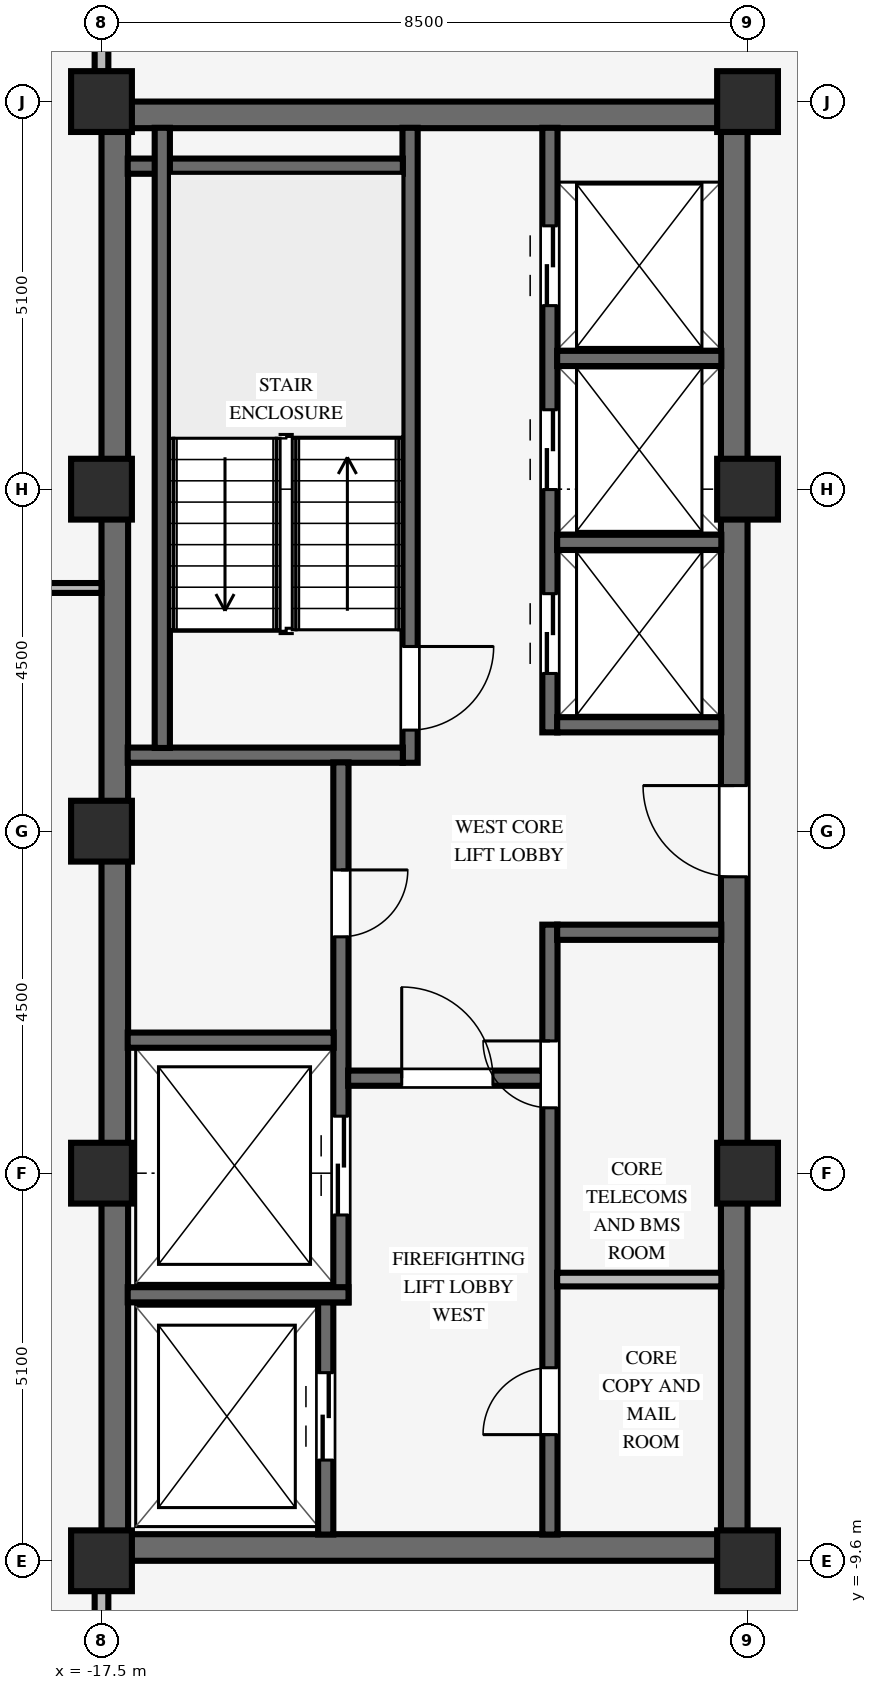
"""IFC4 building model, lengths in metres.
Left out: names, types, materials, properties, quantities, classifications, styles, units other than length and angle.
Written with IfcOpenShell. Run it as: python <this file> out.ifc"""

import sys

from ifc_helpers import new_model, si_unit, direction, frame, frame_2d, origin, origin_2d, place, context, subcontext, project, spatial, rectangle, extrude, source, transform, mapped, element, fill, save


model = new_model("IFC4")
c1 = context("Model", 3, precision=1e-05, world=origin(), true_north=direction((0.0, 1.0)))
c2 = subcontext(c1, "Body", "Model", "MODEL_VIEW")
j1 = project(units=[si_unit("LENGTHUNIT", "METRE"), si_unit("PLANEANGLEUNIT", "RADIAN")], contexts=[c1])
p1 = place(None, origin())
s1 = spatial("IfcSite", under=j1, at=p1, CompositionType="ELEMENT")
p2 = place(p1, origin())
s2 = spatial("IfcBuilding", under=s1, at=p2, CompositionType="ELEMENT")
p3 = place(p2, frame((0.0, 0.0, 238.35)))
s3 = spatial("IfcBuildingStorey", under=s2, at=p3, CompositionType="ELEMENT", Elevation=238.35)
for number, where, z_axis, x_axis in (
    (1, (-17.5, -9.425, 0.0), (0.0, 0.0, 1.0), (1.0, 0.0, 0.0)),
    (2, (-17.5, 9.425, 0.0), (0.0, 0.0, 1.0), (1.0, 0.0, 0.0)),
):
    element("IfcWall", number, at=place(p3, frame(where, z_axis=z_axis, x_axis=x_axis)), inside=s3, PredefinedType="SHEAR", context=c2, shape_type="SweptSolid", body=[
        extrude(rectangle(XDim=8.5, YDim=0.35, at=frame_2d((4.25, 0.0))), origin(), (0.0, 0.0, 1.0), 3.37),
    ])
p4 = place(p3, frame((-17.325, -9.255, 0.0), z_axis=(0.0, 0.0, 1.0), x_axis=(0.0, 1.0, 0.0)))
e3 = element("IfcWall", 3, at=p4, inside=s3, PredefinedType="SHEAR", context=c2, shape_type="SweptSolid", body=[
    extrude(rectangle(XDim=18.51, YDim=0.35, at=frame_2d((9.255, 0.0))), origin(), (0.0, 0.0, 1.0), 3.37),
])
p5 = place(p3, frame((-9.175, -9.255, 0.0), z_axis=(0.0, 0.0, 1.0), x_axis=(0.0, 1.0, 0.0)))
e4 = element("IfcWall", 4, at=p5, inside=s3, PredefinedType="SHEAR", context=c2, shape_type="SweptSolid", body=[
    extrude(rectangle(XDim=18.51, YDim=0.35, at=frame_2d((9.255, 0.0))), origin(), (0.0, 0.0, 1.0), 3.37),
])
p6 = place(p5, frame((8.655, 0.0, 0.0)))
e5 = element("IfcOpeningElement", 5, at=p6, cuts=e4, PredefinedType="OPENING", context=c2, shape_type="SweptSolid", body=[
    extrude(rectangle(XDim=1.2, YDim=2.15, at=frame_2d((0.6, 1.075))), frame((0.0, 0.185, 0.0), z_axis=(0.0, -1.0, 0.0), x_axis=(1.0, 0.0, 0.0)), (0.0, 0.0, 1.0), 0.37),
])
for number, where, z_axis, x_axis in (
    (6, (-17.5, -9.6, 0.0), (0.0, 0.0, 1.0), (1.0, 0.0, 0.0)),
    (7, (-17.5, -4.5, 0.0), (0.0, 0.0, 1.0), (1.0, 0.0, 0.0)),
    (8, (-17.5, 4.5, 0.0), (0.0, 0.0, 1.0), (1.0, 0.0, 0.0)),
    (9, (-17.5, 9.6, 0.0), (0.0, 0.0, 1.0), (1.0, 0.0, 0.0)),
    (10, (-9.0, -9.6, 0.0), (0.0, 0.0, 1.0), (1.0, 0.0, 0.0)),
    (11, (-9.0, -4.5, 0.0), (0.0, 0.0, 1.0), (1.0, 0.0, 0.0)),
    (12, (-9.0, 4.5, 0.0), (0.0, 0.0, 1.0), (1.0, 0.0, 0.0)),
    (13, (-9.0, 9.6, 0.0), (0.0, 0.0, 1.0), (1.0, 0.0, 0.0)),
    (14, (-17.5, 0.0, 0.0), (0.0, 0.0, 1.0), (1.0, 0.0, 0.0)),
):
    element("IfcColumn", number, at=place(p3, frame(where, z_axis=z_axis, x_axis=x_axis)), inside=s3, PredefinedType="COLUMN", context=c2, shape_type="SweptSolid", body=[
        extrude(rectangle(XDim=0.8, YDim=0.8, at=origin_2d()), origin(), (0.0, 0.0, 1.0), 3.37),
    ])
p7 = place(p3, frame((-13.44, 0.9, 0.0), z_axis=(0.0, 0.0, 1.0), x_axis=(0.0, 1.0, 0.0)))
e15 = element("IfcWall", 15, at=p7, inside=s3, PredefinedType="SHEAR", context=c2, shape_type="SweptSolid", body=[
    extrude(rectangle(XDim=8.355, YDim=0.2, at=frame_2d((4.177, 0.0))), origin(), (0.0, 0.0, 1.0), 3.37),
])
p8 = place(p7, frame((1.53, 0.0, 0.0), z_axis=(0.0, 0.0, 1.0), x_axis=(-1.0, 0.0, 0.0)))
e16 = element("IfcOpeningElement", 16, at=p8, cuts=e15, PredefinedType="OPENING", context=c2, shape_type="SweptSolid", body=[
    extrude(rectangle(XDim=1.1, YDim=2.15, at=frame_2d((0.55, 1.075))), frame((0.0, 0.11, 0.0), z_axis=(0.0, -1.0, 0.0), x_axis=(1.0, 0.0, 0.0)), (0.0, 0.0, 1.0), 0.22),
])
for number, where, z_axis, x_axis in (
    (17, (-17.155, 1.0, 0.0), (0.0, 0.0, 1.0), (1.0, 0.0, 0.0)),
    (18, (-17.155, 8.75, 0.0), (0.0, 0.0, 1.0), (1.0, 0.0, 0.0)),
):
    element("IfcWall", number, at=place(p3, frame(where, z_axis=z_axis, x_axis=x_axis)), inside=s3, PredefinedType="SHEAR", context=c2, shape_type="SweptSolid", body=[
        extrude(rectangle(XDim=3.62, YDim=0.2, at=frame_2d((1.81, 0.0))), origin(), (0.0, 0.0, 1.0), 3.37),
    ])
p9 = place(p3, frame((-16.7, 1.095, 0.0), z_axis=(0.0, 0.0, 1.0), x_axis=(0.0, 1.0, 0.0)))
e19 = element("IfcWall", 19, at=p9, inside=s3, PredefinedType="SHEAR", context=c2, shape_type="SweptSolid", body=[
    extrude(rectangle(XDim=8.16, YDim=0.2, at=frame_2d((4.08, 0.0))), origin(), (0.0, 0.0, 1.0), 3.37),
])
p10 = place(p3, frame((-14.55, -9.255, 0.0), z_axis=(0.0, 0.0, 1.0), x_axis=(0.0, 1.0, 0.0)))
e20 = element("IfcWall", 20, at=p10, inside=s3, PredefinedType="SHEAR", context=c2, shape_type="SweptSolid", body=[
    extrude(rectangle(XDim=3.06, YDim=0.2, at=frame_2d((1.53, 0.0))), origin(), (0.0, 0.0, 1.0), 3.37),
])
p11 = place(p10, frame((0.98, 0.0, 0.0)))
e21 = element("IfcOpeningElement", 21, at=p11, cuts=e20, PredefinedType="OPENING", context=c2, shape_type="SweptSolid", body=[
    extrude(rectangle(XDim=1.15, YDim=2.15, at=frame_2d((0.575, 1.075))), frame((0.0, 0.11, 0.0), z_axis=(0.0, -1.0, 0.0), x_axis=(1.0, 0.0, 0.0)), (0.0, 0.0, 1.0), 0.22),
])
p12 = place(p3, frame((-14.35, -6.2, 0.0), z_axis=(0.0, 0.0, 1.0), x_axis=(0.0, 1.0, 0.0)))
e22 = element("IfcWall", 22, at=p12, inside=s3, PredefinedType="SHEAR", context=c2, shape_type="SweptSolid", body=[
    extrude(rectangle(XDim=7.105, YDim=0.2, at=frame_2d((3.552, 0.0))), origin(), (0.0, 0.0, 1.0), 3.37),
])
p13 = place(p12, frame((5.69, 0.0, 0.0), z_axis=(0.0, 0.0, 1.0), x_axis=(-1.0, 0.0, 0.0)))
e23 = element("IfcOpeningElement", 23, at=p13, cuts=e22, PredefinedType="OPENING", context=c2, shape_type="SweptSolid", body=[
    extrude(rectangle(XDim=0.88, YDim=2.1, at=frame_2d((0.44, 1.05))), frame((0.0, 0.11, 0.0), z_axis=(0.0, -1.0, 0.0), x_axis=(1.0, 0.0, 0.0)), (0.0, 0.0, 1.0), 0.22),
])
p14 = place(p12, frame((1.15, 0.0, 0.0)))
e24 = element("IfcOpeningElement", 24, at=p14, cuts=e22, PredefinedType="OPENING", context=c2, shape_type="SweptSolid", body=[
    extrude(rectangle(XDim=1.3, YDim=2.2, at=frame_2d((0.65, 1.1))), frame((0.0, 0.11, 0.0), z_axis=(0.0, -1.0, 0.0), x_axis=(1.0, 0.0, 0.0)), (0.0, 0.0, 1.0), 0.22),
])
p15 = place(p3, frame((-17.155, -6.1, 0.0), z_axis=(0.0, 0.0, 1.0), x_axis=(1.0, 0.0, 0.0)))
e25 = element("IfcWall", 25, at=p15, inside=s3, PredefinedType="SHEAR", context=c2, shape_type="SweptSolid", body=[
    extrude(rectangle(XDim=2.905, YDim=0.2, at=frame_2d((1.453, 0.0))), origin(), (0.0, 0.0, 1.0), 3.37),
])
p16 = place(p3, frame((-17.155, -2.75, 0.0), z_axis=(0.0, 0.0, 1.0), x_axis=(1.0, 0.0, 0.0)))
e26 = element("IfcWall", 26, at=p16, inside=s3, PredefinedType="SHEAR", context=c2, shape_type="SweptSolid", body=[
    extrude(rectangle(XDim=2.71, YDim=0.2, at=frame_2d((1.355, 0.0))), origin(), (0.0, 0.0, 1.0), 3.37),
])
p17 = place(p3, frame((-11.6, -9.255, 0.0), z_axis=(0.0, 0.0, 1.0), x_axis=(0.0, 1.0, 0.0)))
e27 = element("IfcWall", 27, at=p17, inside=s3, PredefinedType="SHEAR", context=c2, shape_type="SweptSolid", body=[
    extrude(rectangle(XDim=8.025, YDim=0.2, at=frame_2d((4.012, 0.0))), origin(), (0.0, 0.0, 1.0), 3.37),
])
p18 = place(p17, frame((1.315, 0.0, 0.0)))
e28 = element("IfcOpeningElement", 28, at=p18, cuts=e27, PredefinedType="OPENING", context=c2, shape_type="SweptSolid", body=[
    extrude(rectangle(XDim=0.88, YDim=2.1, at=frame_2d((0.44, 1.05))), frame((0.0, 0.11, 0.0), z_axis=(0.0, -1.0, 0.0), x_axis=(1.0, 0.0, 0.0)), (0.0, 0.0, 1.0), 0.22),
])
p19 = place(p17, frame((5.615, 0.0, 0.0)))
e29 = element("IfcOpeningElement", 29, at=p19, cuts=e27, PredefinedType="OPENING", context=c2, shape_type="SweptSolid", body=[
    extrude(rectangle(XDim=0.88, YDim=2.1, at=frame_2d((0.44, 1.05))), frame((0.0, 0.11, 0.0), z_axis=(0.0, -1.0, 0.0), x_axis=(1.0, 0.0, 0.0)), (0.0, 0.0, 1.0), 0.22),
])
p20 = place(p3, frame((-14.255, -3.25, 0.0), z_axis=(0.0, 0.0, 1.0), x_axis=(1.0, 0.0, 0.0)))
e30 = element("IfcWall", 30, at=p20, inside=s3, PredefinedType="SHEAR", context=c2, shape_type="SweptSolid", body=[
    extrude(rectangle(XDim=2.56, YDim=0.2, at=frame_2d((1.28, 0.0))), origin(), (0.0, 0.0, 1.0), 3.37),
])
p21 = place(p20, frame((0.705, 0.0, 0.0)))
e31 = element("IfcOpeningElement", 31, at=p21, cuts=e30, PredefinedType="OPENING", context=c2, shape_type="SweptSolid", body=[
    extrude(rectangle(XDim=1.2, YDim=2.15, at=frame_2d((0.6, 1.075))), frame((0.0, 0.11, 0.0), z_axis=(0.0, -1.0, 0.0), x_axis=(1.0, 0.0, 0.0)), (0.0, 0.0, 1.0), 0.22),
])
p22 = place(p3, frame((-11.505, -1.33, 0.0), z_axis=(0.0, 0.0, 1.0), x_axis=(1.0, 0.0, 0.0)))
e32 = element("IfcWall", 32, at=p22, inside=s3, PredefinedType="SHEAR", context=c2, shape_type="SweptSolid", body=[
    extrude(rectangle(XDim=2.16, YDim=0.2, at=frame_2d((1.08, 0.0))), origin(), (0.0, 0.0, 1.0), 3.37),
])
p23 = place(p3, frame((-11.505, -5.9, 0.0), z_axis=(0.0, 0.0, 1.0), x_axis=(1.0, 0.0, 0.0)))
e33 = element("IfcWall", 33, at=p23, inside=s3, PredefinedType="PARTITIONING", context=c2, shape_type="SweptSolid", body=[
    extrude(rectangle(XDim=2.16, YDim=0.18, at=frame_2d((1.08, 0.0))), origin(), (0.0, 0.0, 1.0), 3.36),
])
p24 = place(p3, frame((-11.6, 1.3, 0.0), z_axis=(0.0, 0.0, 1.0), x_axis=(0.0, 1.0, 0.0)))
e34 = element("IfcWall", 34, at=p24, inside=s3, PredefinedType="SHEAR", context=c2, shape_type="SweptSolid", body=[
    extrude(rectangle(XDim=7.955, YDim=0.2, at=frame_2d((3.978, 0.0))), origin(), (0.0, 0.0, 1.0), 3.37),
])
p25 = place(p24, frame((0.775, 0.0, 0.0)))
e35 = element("IfcOpeningElement", 35, at=p25, cuts=e34, PredefinedType="OPENING", context=c2, shape_type="SweptSolid", body=[
    extrude(rectangle(XDim=1.05, YDim=2.15, at=frame_2d((0.525, 1.075))), frame((0.0, 0.11, 0.0), z_axis=(0.0, -1.0, 0.0), x_axis=(1.0, 0.0, 0.0)), (0.0, 0.0, 1.0), 0.22),
])
p26 = place(p24, frame((3.195, 0.0, 0.0)))
e36 = element("IfcOpeningElement", 36, at=p26, cuts=e34, PredefinedType="OPENING", context=c2, shape_type="SweptSolid", body=[
    extrude(rectangle(XDim=1.05, YDim=2.15, at=frame_2d((0.525, 1.075))), frame((0.0, 0.11, 0.0), z_axis=(0.0, -1.0, 0.0), x_axis=(1.0, 0.0, 0.0)), (0.0, 0.0, 1.0), 0.22),
])
p27 = place(p24, frame((5.615, 0.0, 0.0)))
e37 = element("IfcOpeningElement", 37, at=p27, cuts=e34, PredefinedType="OPENING", context=c2, shape_type="SweptSolid", body=[
    extrude(rectangle(XDim=1.05, YDim=2.15, at=frame_2d((0.525, 1.075))), frame((0.0, 0.11, 0.0), z_axis=(0.0, -1.0, 0.0), x_axis=(1.0, 0.0, 0.0)), (0.0, 0.0, 1.0), 0.22),
])
for number, where, z_axis, x_axis in (
    (38, (-11.505, 1.4, 0.0), (0.0, 0.0, 1.0), (1.0, 0.0, 0.0)),
    (39, (-11.505, 3.8, 0.0), (0.0, 0.0, 1.0), (1.0, 0.0, 0.0)),
    (40, (-11.505, 6.22, 0.0), (0.0, 0.0, 1.0), (1.0, 0.0, 0.0)),
):
    element("IfcWall", number, at=place(p3, frame(where, z_axis=z_axis, x_axis=x_axis)), inside=s3, PredefinedType="SHEAR", context=c2, shape_type="SweptSolid", body=[
        extrude(rectangle(XDim=2.16, YDim=0.2, at=frame_2d((1.08, 0.0))), origin(), (0.0, 0.0, 1.0), 3.37),
    ])
p28 = place(p3, frame((-26.1, 3.2, 0.0), z_axis=(0.0, 0.0, 1.0), x_axis=(1.0, 0.0, 0.0)))
e41 = element("IfcWall", 41, at=p28, inside=s3, PredefinedType="PARTITIONING", context=c2, shape_type="SweptSolid", body=[
    extrude(rectangle(XDim=8.6, YDim=0.13, at=frame_2d((4.3, 0.0))), origin(), (0.0, 0.0, 1.0), 3.36),
])
for number, where, z_axis, x_axis in (
    (42, (-17.5, -11.114, 0.0), (0.0, 0.0, 1.0), (0.0, 1.0, 0.0)),
    (43, (-17.5, 9.996, 0.0), (0.0, 0.0, 1.0), (0.0, 1.0, 0.0)),
):
    element("IfcWall", number, at=place(p3, frame(where, z_axis=z_axis, x_axis=x_axis)), inside=s3, PredefinedType="PARTITIONING", context=c2, shape_type="SweptSolid", body=[
        extrude(rectangle(XDim=1.118, YDim=0.18, at=frame_2d((0.559, 0.0))), origin(), (0.0, 0.0, 1.0), 2.892),
    ])
m1 = source(origin(), c2, "Body", "SweptSolid", [
    extrude(rectangle(XDim=1.1, YDim=2.15, at=frame_2d((0.55, 1.075))), frame((0.0, 0.025, 0.0), z_axis=(0.0, -1.0, 0.0), x_axis=(1.0, 0.0, 0.0)), (0.0, 0.0, 1.0), 0.05),
])
p29 = place(p8, origin())
e44 = element("IfcDoor", 44, at=p29, inside=s3, OperationType="SINGLE_SWING_LEFT", PredefinedType="DOOR", context=c2, shape_type="MappedRepresentation", body=[
    mapped(m1, transform((0.0, 0.0, 0.0), scale=1.0)),
])
fill(e16, e44)
m2 = source(origin(), c2, "Body", "SweptSolid", [
    extrude(rectangle(XDim=0.88, YDim=2.1, at=frame_2d((0.44, 1.05))), frame((0.0, 0.025, 0.0), z_axis=(0.0, -1.0, 0.0), x_axis=(1.0, 0.0, 0.0)), (0.0, 0.0, 1.0), 0.05),
])
p30 = place(p13, origin())
e45 = element("IfcDoor", 45, at=p30, inside=s3, OperationType="SINGLE_SWING_LEFT", PredefinedType="DOOR", context=c2, shape_type="MappedRepresentation", body=[
    mapped(m2, transform((0.0, 0.0, 0.0), scale=1.0)),
])
fill(e23, e45)
m3 = source(origin(), c2, "Body", "SweptSolid", [
    extrude(rectangle(XDim=1.2, YDim=2.15, at=frame_2d((0.6, 1.075))), frame((0.0, 0.025, 0.0), z_axis=(0.0, -1.0, 0.0), x_axis=(1.0, 0.0, 0.0)), (0.0, 0.0, 1.0), 0.05),
])
p31 = place(p21, origin())
e46 = element("IfcDoor", 46, at=p31, inside=s3, OperationType="SINGLE_SWING_LEFT", PredefinedType="DOOR", context=c2, shape_type="MappedRepresentation", body=[
    mapped(m3, transform((0.0, 0.0, 0.0), scale=1.0)),
])
fill(e31, e46)
p32 = place(p18, origin())
e47 = element("IfcDoor", 47, at=p32, inside=s3, OperationType="SINGLE_SWING_LEFT", PredefinedType="DOOR", context=c2, shape_type="MappedRepresentation", body=[
    mapped(m2, transform((0.0, 0.0, 0.0), scale=1.0)),
])
fill(e28, e47)
p33 = place(p19, origin())
e48 = element("IfcDoor", 48, at=p33, inside=s3, OperationType="SINGLE_SWING_RIGHT", PredefinedType="DOOR", context=c2, shape_type="MappedRepresentation", body=[
    mapped(m2, transform((0.0, 0.0, 0.0), scale=1.0)),
])
fill(e29, e48)
p34 = place(p6, origin())
e49 = element("IfcDoor", 49, at=p34, inside=s3, OperationType="SINGLE_SWING_RIGHT", PredefinedType="DOOR", context=c2, shape_type="MappedRepresentation", body=[
    mapped(m3, transform((0.0, 0.0, 0.0), scale=1.0)),
])
fill(e5, e49)
m4 = source(origin(), c2, "Body", "SweptSolid", [
    extrude(rectangle(XDim=1.15, YDim=2.15, at=frame_2d((0.575, 1.075))), frame((0.0, 0.025, 0.0), z_axis=(0.0, -1.0, 0.0), x_axis=(1.0, 0.0, 0.0)), (0.0, 0.0, 1.0), 0.05),
])
p35 = place(p11, origin())
e50 = element("IfcDoor", 50, at=p35, inside=s3, OperationType="DOUBLE_DOOR_SLIDING", PredefinedType="DOOR", context=c2, shape_type="MappedRepresentation", body=[
    mapped(m4, transform((0.0, 0.0, 0.0), scale=1.0)),
])
fill(e21, e50)
m5 = source(origin(), c2, "Body", "SweptSolid", [
    extrude(rectangle(XDim=1.3, YDim=2.2, at=frame_2d((0.65, 1.1))), frame((0.0, 0.025, 0.0), z_axis=(0.0, -1.0, 0.0), x_axis=(1.0, 0.0, 0.0)), (0.0, 0.0, 1.0), 0.05),
])
p36 = place(p14, origin())
e51 = element("IfcDoor", 51, at=p36, inside=s3, OperationType="DOUBLE_DOOR_SLIDING", PredefinedType="DOOR", context=c2, shape_type="MappedRepresentation", body=[
    mapped(m5, transform((0.0, 0.0, 0.0), scale=1.0)),
])
fill(e24, e51)
m6 = source(origin(), c2, "Body", "SweptSolid", [
    extrude(rectangle(XDim=1.05, YDim=2.15, at=frame_2d((0.525, 1.075))), frame((0.0, 0.025, 0.0), z_axis=(0.0, -1.0, 0.0), x_axis=(1.0, 0.0, 0.0)), (0.0, 0.0, 1.0), 0.05),
])
p37 = place(p25, origin())
e52 = element("IfcDoor", 52, at=p37, inside=s3, OperationType="DOUBLE_DOOR_SLIDING", PredefinedType="DOOR", context=c2, shape_type="MappedRepresentation", body=[
    mapped(m6, transform((0.0, 0.0, 0.0), scale=1.0)),
])
fill(e35, e52)
p38 = place(p26, origin())
e53 = element("IfcDoor", 53, at=p38, inside=s3, OperationType="DOUBLE_DOOR_SLIDING", PredefinedType="DOOR", context=c2, shape_type="MappedRepresentation", body=[
    mapped(m6, transform((0.0, 0.0, 0.0), scale=1.0)),
])
fill(e36, e53)
p39 = place(p27, origin())
e54 = element("IfcDoor", 54, at=p39, inside=s3, OperationType="DOUBLE_DOOR_SLIDING", PredefinedType="DOOR", context=c2, shape_type="MappedRepresentation", body=[
    mapped(m6, transform((0.0, 0.0, 0.0), scale=1.0)),
])
fill(e37, e54)
save(model, sys.argv[1])
